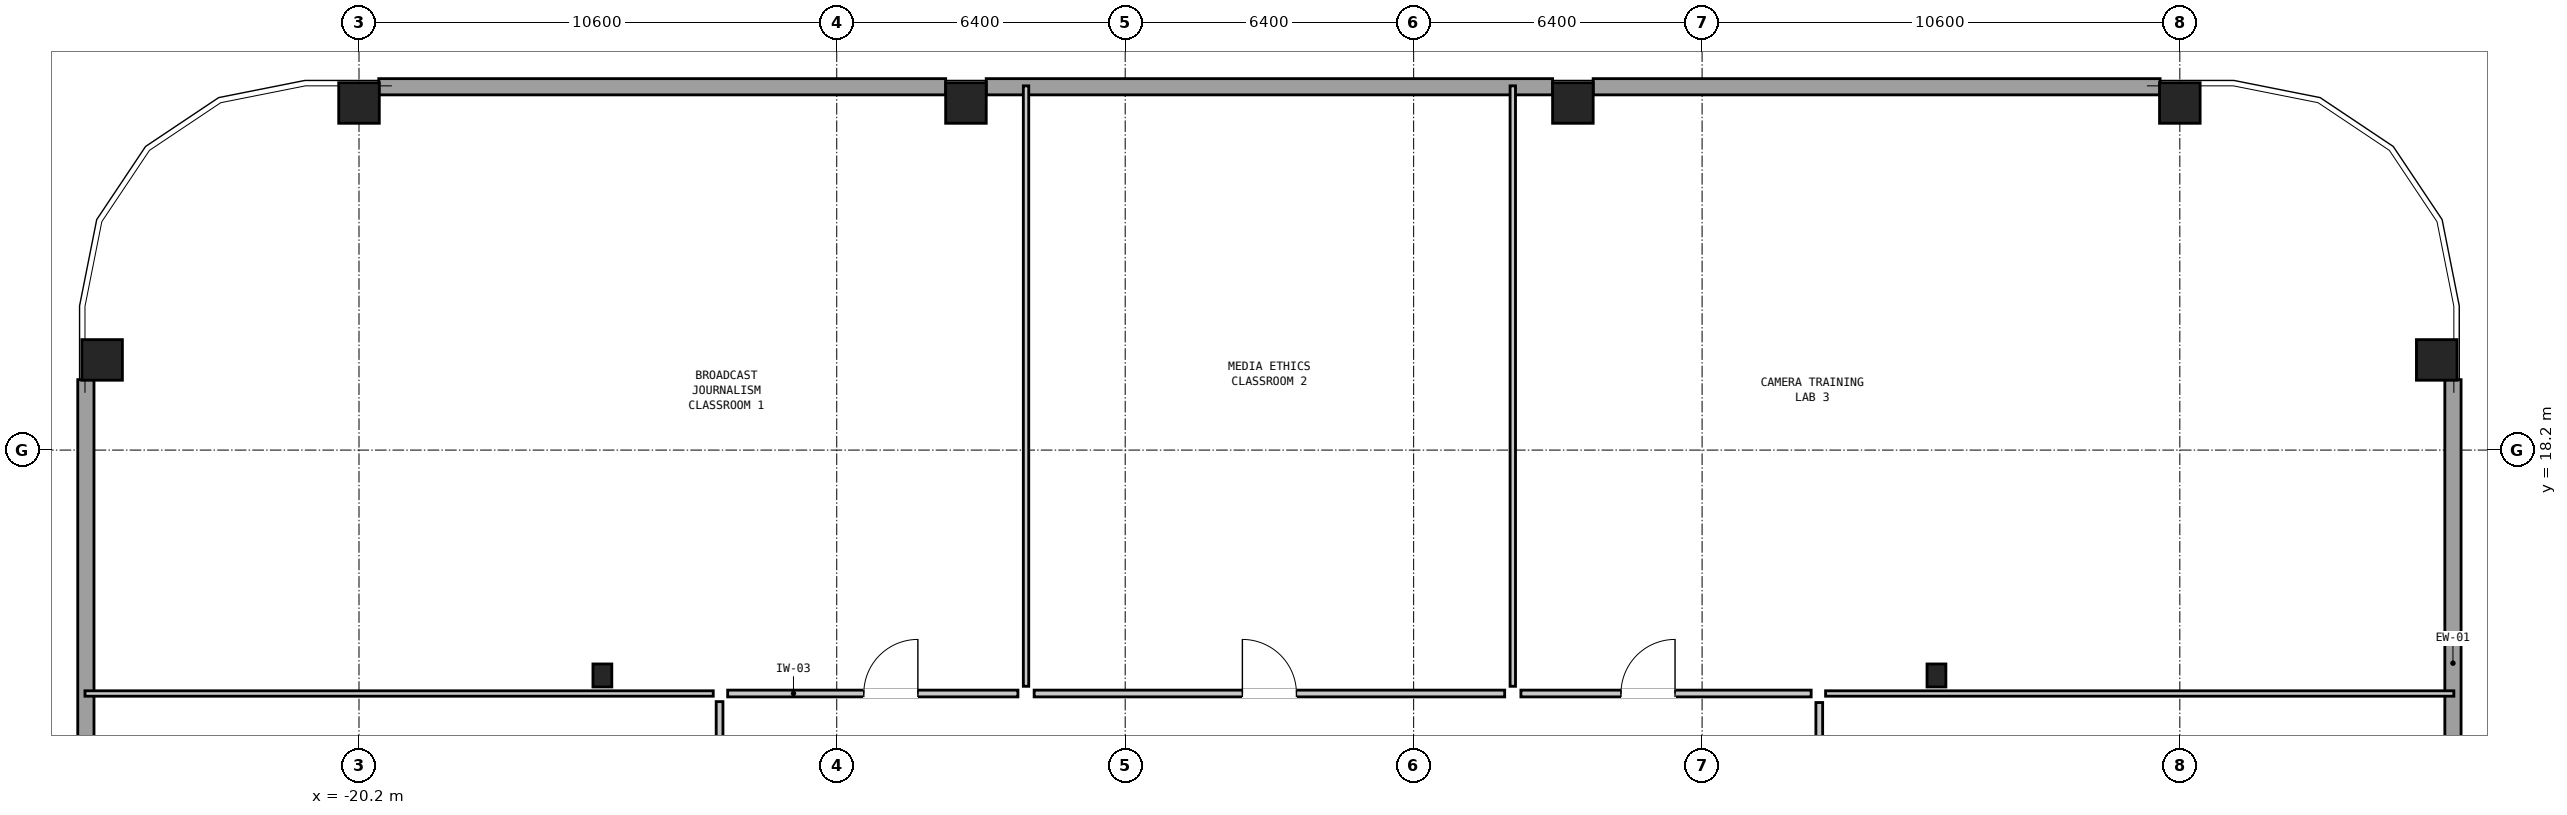
"""IFC4 building model, lengths in metres.
Left out: names, types, materials, properties, quantities, classifications, styles, units other than length and angle.
Written with IfcOpenShell. Run it as: python <this file> out.ifc"""

import sys

from ifc_helpers import new_model, si_unit, direction, frame, frame_2d, origin, origin_2d, place, context, subcontext, project, spatial, rectangle, hollow_rectangle, i_section, extrude, element, fill, save


model = new_model("IFC4")
c1 = context("Model", 3, precision=1e-05, world=origin(), true_north=direction((0.0, 1.0)))
c2 = subcontext(c1, "Body", "Model", "MODEL_VIEW")
j1 = project(units=[si_unit("LENGTHUNIT", "METRE"), si_unit("PLANEANGLEUNIT", "RADIAN")], contexts=[c1])
p1 = place(None, origin())
s1 = spatial("IfcSite", under=j1, at=p1, CompositionType="ELEMENT")
p2 = place(p1, origin())
s2 = spatial("IfcBuilding", under=s1, at=p2, CompositionType="ELEMENT")
p3 = place(p2, frame((0.0, 0.0, 50.5)))
s3 = spatial("IfcBuildingStorey", under=s2, at=p3, CompositionType="ELEMENT", Elevation=50.5)
for number, where, z_axis, x_axis in (
    (1, (25.9, 20.2, 0.0), (0.0, 0.0, 1.0), (0.0, 1.0, 0.0)),
    (2, (20.2, 25.9, 0.0), (0.0, 0.0, 1.0), (1.0, 0.0, 0.0)),
    (3, (6.733, 25.9, 0.0), (0.0, 0.0, 1.0), (1.0, 0.0, 0.0)),
    (4, (-6.733, 25.9, 0.0), (0.0, 0.0, 1.0), (1.0, 0.0, 0.0)),
    (5, (-20.2, 25.9, 0.0), (0.0, 0.0, 1.0), (1.0, 0.0, 0.0)),
    (6, (-25.9, 20.2, 0.0), (0.0, 0.0, 1.0), (0.0, 1.0, 0.0)),
):
    element("IfcColumn", number, at=place(p3, frame(where, z_axis=z_axis, x_axis=x_axis)), inside=s3, PredefinedType="COLUMN", context=c2, shape_type="SweptSolid", body=[
        extrude(hollow_rectangle(XDim=0.9, YDim=0.9, WallThickness=0.055, at=origin_2d()), origin(), (0.0, 0.0, 1.0), 3.05),
    ])
for number, where, z_axis, x_axis in (
    (7, (-14.8, 13.2, 0.0), (0.0, 0.0, 1.0), (1.0, 0.0, 0.0)),
    (8, (14.8, 13.2, 0.0), (0.0, 0.0, 1.0), (1.0, 0.0, 0.0)),
):
    element("IfcColumn", number, at=place(p3, frame(where, z_axis=z_axis, x_axis=x_axis)), inside=s3, PredefinedType="COLUMN", context=c2, shape_type="SweptSolid", body=[
        extrude(i_section(OverallWidth=0.418, OverallDepth=0.51, WebThickness=0.042, FlangeThickness=0.068, at=origin_2d()), origin(), (0.0, 0.0, 1.0), 3.05),
    ])
for number, where, z_axis, x_axis in (
    (9, (26.26, 19.762, 0.0), (0.0, 0.0, 1.0), (0.0, -1.0, 0.0)),
    (10, (-19.762, 26.26, 0.0), (0.0, 0.0, 1.0), (1.0, 0.0, 0.0)),
):
    element("IfcWall", number, at=place(p3, frame(where, z_axis=z_axis, x_axis=x_axis)), inside=s3, PredefinedType="SOLIDWALL", context=c2, shape_type="SweptSolid", body=[
        extrude(rectangle(XDim=12.579, YDim=0.36, at=frame_2d((6.289, 0.0))), origin(), (0.0, 0.0, 1.0), 0.95),
    ])
p4 = place(p3, frame((-6.283, 26.26, 0.0), z_axis=(0.0, 0.0, 1.0), x_axis=(1.0, 0.0, 0.0)))
e11 = element("IfcWall", 11, at=p4, inside=s3, PredefinedType="SOLIDWALL", context=c2, shape_type="SweptSolid", body=[
    extrude(rectangle(XDim=12.566, YDim=0.36, at=frame_2d((6.283, 0.0))), origin(), (0.0, 0.0, 1.0), 0.95),
])
for number, where, z_axis, x_axis in (
    (12, (7.183, 26.26, 0.0), (0.0, 0.0, 1.0), (1.0, 0.0, 0.0)),
    (13, (-26.26, 7.183, 0.0), (0.0, 0.0, 1.0), (0.0, 1.0, 0.0)),
):
    element("IfcWall", number, at=place(p3, frame(where, z_axis=z_axis, x_axis=x_axis)), inside=s3, PredefinedType="SOLIDWALL", context=c2, shape_type="SweptSolid", body=[
        extrude(rectangle(XDim=12.579, YDim=0.36, at=frame_2d((6.289, 0.0))), origin(), (0.0, 0.0, 1.0), 0.95),
    ])
for number, where, z_axis, x_axis in (
    (14, (-26.28, 12.8, 0.0), (0.0, 0.0, 1.0), (1.0, 0.0, 0.0)),
    (15, (12.34, 12.8, 0.0), (0.0, 0.0, 1.0), (1.0, 0.0, 0.0)),
):
    element("IfcWall", number, at=place(p3, frame(where, z_axis=z_axis, x_axis=x_axis)), inside=s3, PredefinedType="PARTITIONING", context=c2, shape_type="SweptSolid", body=[
        extrude(rectangle(XDim=13.94, YDim=0.12, at=frame_2d((6.97, 0.0))), origin(), (0.0, 0.0, 1.0), 2.83),
    ])
for number, where, z_axis, x_axis in (
    (16, (-5.4, 12.96, 0.0), (0.0, 0.0, 1.0), (0.0, 1.0, 0.0)),
    (17, (5.4, 12.96, 0.0), (0.0, 0.0, 1.0), (0.0, 1.0, 0.0)),
):
    element("IfcWall", number, at=place(p3, frame(where, z_axis=z_axis, x_axis=x_axis)), inside=s3, PredefinedType="PARTITIONING", context=c2, shape_type="SweptSolid", body=[
        extrude(rectangle(XDim=13.32, YDim=0.12, at=frame_2d((6.66, 0.0))), origin(), (0.0, 0.0, 1.0), 2.83),
    ])
p5 = place(p3, frame((-12.02, 12.8, 0.0), z_axis=(0.0, 0.0, 1.0), x_axis=(1.0, 0.0, 0.0)))
e18 = element("IfcWall", 18, at=p5, inside=s3, PredefinedType="PARTITIONING", context=c2, shape_type="SweptSolid", body=[
    extrude(rectangle(XDim=6.44, YDim=0.15, at=frame_2d((3.22, 0.0))), origin(), (0.0, 0.0, 1.0), 2.83),
])
p6 = place(p5, frame((3.02, 0.0, 0.0)))
e19 = element("IfcOpeningElement", 19, at=p6, cuts=e18, PredefinedType="OPENING", context=c2, shape_type="SweptSolid", body=[
    extrude(rectangle(XDim=1.2, YDim=2.1, at=frame_2d((0.6, 1.05))), frame((0.0, 0.087, 0.0), z_axis=(0.0, -1.0, 0.0), x_axis=(1.0, 0.0, 0.0)), (0.0, 0.0, 1.0), 0.174),
])
p7 = place(p3, frame((-5.22, 12.8, 0.0), z_axis=(0.0, 0.0, 1.0), x_axis=(1.0, 0.0, 0.0)))
e20 = element("IfcWall", 20, at=p7, inside=s3, PredefinedType="PARTITIONING", context=c2, shape_type="SweptSolid", body=[
    extrude(rectangle(XDim=10.44, YDim=0.15, at=frame_2d((5.22, 0.0))), origin(), (0.0, 0.0, 1.0), 2.83),
])
p8 = place(p7, frame((4.62, 0.0, 0.0)))
e21 = element("IfcOpeningElement", 21, at=p8, cuts=e20, PredefinedType="OPENING", context=c2, shape_type="SweptSolid", body=[
    extrude(rectangle(XDim=1.2, YDim=2.1, at=frame_2d((0.6, 1.05))), frame((0.0, 0.087, 0.0), z_axis=(0.0, -1.0, 0.0), x_axis=(1.0, 0.0, 0.0)), (0.0, 0.0, 1.0), 0.174),
])
p9 = place(p3, frame((5.58, 12.8, 0.0), z_axis=(0.0, 0.0, 1.0), x_axis=(1.0, 0.0, 0.0)))
e22 = element("IfcWall", 22, at=p9, inside=s3, PredefinedType="PARTITIONING", context=c2, shape_type="SweptSolid", body=[
    extrude(rectangle(XDim=6.44, YDim=0.15, at=frame_2d((3.22, 0.0))), origin(), (0.0, 0.0, 1.0), 2.83),
])
p10 = place(p9, frame((2.22, 0.0, 0.0)))
e23 = element("IfcOpeningElement", 23, at=p10, cuts=e22, PredefinedType="OPENING", context=c2, shape_type="SweptSolid", body=[
    extrude(rectangle(XDim=1.2, YDim=2.1, at=frame_2d((0.6, 1.05))), frame((0.0, 0.087, 0.0), z_axis=(0.0, -1.0, 0.0), x_axis=(1.0, 0.0, 0.0)), (0.0, 0.0, 1.0), 0.174),
])
p11 = place(p3, frame((-12.2, 0.18, 0.0), z_axis=(0.0, 0.0, 1.0), x_axis=(0.0, 1.0, 0.0)))
e24 = element("IfcWall", 24, at=p11, inside=s3, PredefinedType="PARTITIONING", context=c2, shape_type="SweptSolid", body=[
    extrude(rectangle(XDim=12.44, YDim=0.15, at=frame_2d((6.22, 0.0))), origin(), (0.0, 0.0, 1.0), 2.83),
])
p12 = place(p11, frame((5.62, 0.0, 0.0)))
e25 = element("IfcOpeningElement", 25, at=p12, cuts=e24, PredefinedType="OPENING", context=c2, shape_type="SweptSolid", body=[
    extrude(rectangle(XDim=1.2, YDim=2.1, at=frame_2d((0.6, 1.05))), frame((0.0, 0.087, 0.0), z_axis=(0.0, -1.0, 0.0), x_axis=(1.0, 0.0, 0.0)), (0.0, 0.0, 1.0), 0.174),
])
p13 = place(p3, frame((12.2, 3.8, 0.0), z_axis=(0.0, 0.0, 1.0), x_axis=(0.0, 1.0, 0.0)))
e26 = element("IfcWall", 26, at=p13, inside=s3, PredefinedType="PARTITIONING", context=c2, shape_type="SweptSolid", body=[
    extrude(rectangle(XDim=8.8, YDim=0.15, at=frame_2d((4.4, 0.0))), origin(), (0.0, 0.0, 1.0), 2.83),
])
p14 = place(p13, frame((3.925, 0.0, 0.0)))
e27 = element("IfcOpeningElement", 27, at=p14, cuts=e26, PredefinedType="OPENING", context=c2, shape_type="SweptSolid", body=[
    extrude(rectangle(XDim=0.95, YDim=2.1, at=frame_2d((0.475, 1.05))), frame((0.0, 0.087, 0.0), z_axis=(0.0, -1.0, 0.0), x_axis=(1.0, 0.0, 0.0)), (0.0, 0.0, 1.0), 0.174),
])
p15 = place(p6, origin())
e28 = element("IfcDoor", 28, at=p15, inside=s3, OperationType="SINGLE_SWING_RIGHT", PredefinedType="DOOR", context=c2, shape_type="SweptSolid", body=[
    extrude(rectangle(XDim=1.2, YDim=2.1, at=frame_2d((0.6, 1.05))), frame((0.0, 0.025, 0.0), z_axis=(0.0, -1.0, 0.0), x_axis=(1.0, 0.0, 0.0)), (0.0, 0.0, 1.0), 0.05),
])
fill(e19, e28)
p16 = place(p8, origin())
e29 = element("IfcDoor", 29, at=p16, inside=s3, OperationType="SINGLE_SWING_LEFT", PredefinedType="DOOR", context=c2, shape_type="SweptSolid", body=[
    extrude(rectangle(XDim=1.2, YDim=2.1, at=frame_2d((0.6, 1.05))), frame((0.0, 0.025, 0.0), z_axis=(0.0, -1.0, 0.0), x_axis=(1.0, 0.0, 0.0)), (0.0, 0.0, 1.0), 0.05),
])
fill(e21, e29)
p17 = place(p10, origin())
e30 = element("IfcDoor", 30, at=p17, inside=s3, OperationType="SINGLE_SWING_RIGHT", PredefinedType="DOOR", context=c2, shape_type="SweptSolid", body=[
    extrude(rectangle(XDim=1.2, YDim=2.1, at=frame_2d((0.6, 1.05))), frame((0.0, 0.025, 0.0), z_axis=(0.0, -1.0, 0.0), x_axis=(1.0, 0.0, 0.0)), (0.0, 0.0, 1.0), 0.05),
])
fill(e23, e30)
save(model, sys.argv[1])
